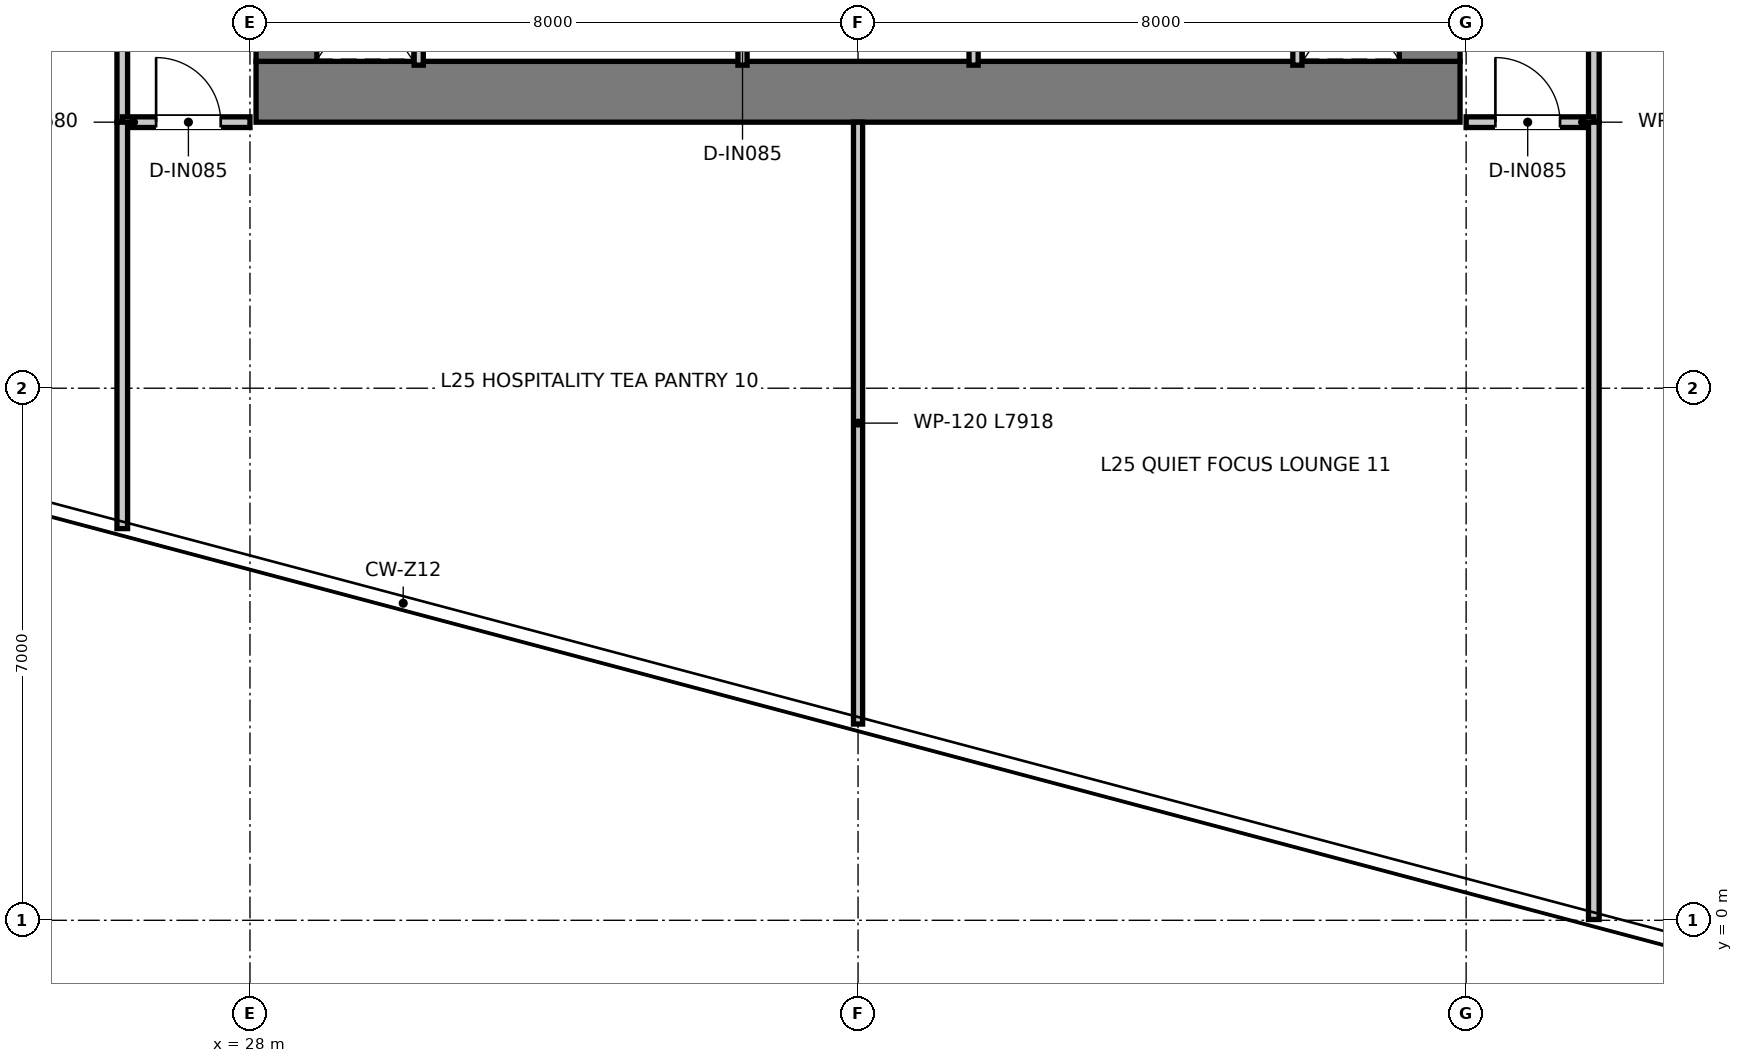
"""IFC4 building model, lengths in metres.
Left out: names, types, materials, properties, quantities, classifications, styles, units other than length and angle.
Written with IfcOpenShell. Run it as: python <this file> out.ifc"""

import sys

from ifc_helpers import new_model, si_unit, direction, frame, frame_2d, origin, place, context, subcontext, project, spatial, rectangle, extrude, element, fill, save


model = new_model("IFC4")
c1 = context("Model", 3, precision=1e-05, world=origin(), true_north=direction((0.0, 1.0)))
c2 = subcontext(c1, "Body", "Model", "MODEL_VIEW")
j1 = project(units=[si_unit("LENGTHUNIT", "METRE"), si_unit("PLANEANGLEUNIT", "RADIAN")], contexts=[c1])
p1 = place(None, origin())
s1 = spatial("IfcSite", under=j1, at=p1, CompositionType="ELEMENT")
p2 = place(p1, origin())
s2 = spatial("IfcBuilding", under=s1, at=p2, CompositionType="ELEMENT")
p3 = place(p2, frame((0.0, 0.0, 105.85)))
s3 = spatial("IfcBuildingStorey", under=s2, at=p3, CompositionType="ELEMENT", Elevation=105.85)
p4 = place(p3, frame((28.08, 10.9, 0.0), z_axis=(0.0, 0.0, 1.0), x_axis=(1.0, 0.0, 0.0)))
e1 = element("IfcWall", 1, at=p4, inside=s3, PredefinedType="SHEAR", context=c2, shape_type="SweptSolid", body=[
    extrude(rectangle(XDim=15.84, YDim=0.8, at=frame_2d((7.92, 0.0))), origin(), (0.0, 0.0, 1.0), 3.95),
])
for number, where, z_axis, x_axis in (
    (2, (28.48, 11.3, 0.0), (0.0, 0.0, 1.0), (0.0, 1.0, 0.0)),
    (3, (43.52, 11.3, 0.0), (0.0, 0.0, 1.0), (0.0, 1.0, 0.0)),
):
    element("IfcWall", number, at=place(p3, frame(where, z_axis=z_axis, x_axis=x_axis)), inside=s3, PredefinedType="SHEAR", context=c2, shape_type="SweptSolid", body=[
        extrude(rectangle(XDim=14.7, YDim=0.8, at=frame_2d((7.35, 0.0))), origin(), (0.0, 0.0, 1.0), 3.95),
    ])
for number, where, z_axis, x_axis in (
    (4, (30.22, 11.25, 0.0), (0.0, 0.0, 1.0), (0.0, 1.0, 0.0)),
    (5, (41.78, 11.25, 0.0), (0.0, 0.0, 1.0), (0.0, 1.0, 0.0)),
):
    element("IfcWall", number, at=place(p3, frame(where, z_axis=z_axis, x_axis=x_axis)), inside=s3, PredefinedType="PARTITIONING", context=c2, shape_type="SweptSolid", body=[
        extrude(rectangle(XDim=1.97, YDim=0.12, at=frame_2d((0.985, 0.0))), origin(), (0.0, 0.0, 1.0), 3.67),
    ])
p5 = place(p3, frame((34.48, 11.25, 0.0), z_axis=(0.0, 0.0, 1.0), x_axis=(0.0, 1.0, 0.0)))
e6 = element("IfcWall", 6, at=p5, inside=s3, PredefinedType="PARTITIONING", context=c2, shape_type="SweptSolid", body=[
    extrude(rectangle(XDim=1.97, YDim=0.12, at=frame_2d((0.985, 0.0))), origin(), (0.0, 0.0, 1.0), 3.67),
])
p6 = place(p5, frame((0.545, 0.0, 0.0)))
e7 = element("IfcOpeningElement", 7, at=p6, cuts=e6, PredefinedType="OPENING", context=c2, shape_type="SweptSolid", body=[
    extrude(rectangle(XDim=0.85, YDim=2.1, at=frame_2d((0.425, 1.05))), frame((0.0, 0.07, 0.0), z_axis=(0.0, -1.0, 0.0), x_axis=(1.0, 0.0, 0.0)), (0.0, 0.0, 1.0), 0.14),
])
p7 = place(p3, frame((37.52, 11.25, 0.0), z_axis=(0.0, 0.0, 1.0), x_axis=(0.0, 1.0, 0.0)))
e8 = element("IfcWall", 8, at=p7, inside=s3, PredefinedType="PARTITIONING", context=c2, shape_type="SweptSolid", body=[
    extrude(rectangle(XDim=1.97, YDim=0.12, at=frame_2d((0.985, 0.0))), origin(), (0.0, 0.0, 1.0), 3.67),
])
p8 = place(p7, frame((0.545, 0.0, 0.0)))
e9 = element("IfcOpeningElement", 9, at=p8, cuts=e8, PredefinedType="OPENING", context=c2, shape_type="SweptSolid", body=[
    extrude(rectangle(XDim=0.85, YDim=2.1, at=frame_2d((0.425, 1.05))), frame((0.0, 0.07, 0.0), z_axis=(0.0, -1.0, 0.0), x_axis=(1.0, 0.0, 0.0)), (0.0, 0.0, 1.0), 0.14),
])
p9 = place(p3, frame((26.32, 10.5, 0.0), z_axis=(0.0, 0.0, 1.0), x_axis=(0.0, 1.0, 0.0)))
e10 = element("IfcWall", 10, at=p9, inside=s3, PredefinedType="PARTITIONING", context=c2, shape_type="SweptSolid", body=[
    extrude(rectangle(XDim=25.62, YDim=0.14, at=frame_2d((12.81, 0.0))), origin(), (0.0, 0.0, 1.0), 2.97),
])
p10 = place(p9, frame((11.775, 0.0, 0.0)))
e11 = element("IfcOpeningElement", 11, at=p10, cuts=e10, PredefinedType="OPENING", context=c2, shape_type="SweptSolid", body=[
    extrude(rectangle(XDim=0.95, YDim=2.1, at=frame_2d((0.475, 1.05))), frame((0.0, 0.08, 0.0), z_axis=(0.0, -1.0, 0.0), x_axis=(1.0, 0.0, 0.0)), (0.0, 0.0, 1.0), 0.16),
])
p11 = place(p9, frame((20.375, 0.0, 0.0)))
e12 = element("IfcOpeningElement", 12, at=p11, cuts=e10, PredefinedType="OPENING", context=c2, shape_type="SweptSolid", body=[
    extrude(rectangle(XDim=0.95, YDim=2.1, at=frame_2d((0.475, 1.05))), frame((0.0, 0.08, 0.0), z_axis=(0.0, -1.0, 0.0), x_axis=(1.0, 0.0, 0.0)), (0.0, 0.0, 1.0), 0.16),
])
p12 = place(p3, frame((45.68, 10.5, 0.0), z_axis=(0.0, 0.0, 1.0), x_axis=(0.0, 1.0, 0.0)))
e13 = element("IfcWall", 13, at=p12, inside=s3, PredefinedType="PARTITIONING", context=c2, shape_type="SweptSolid", body=[
    extrude(rectangle(XDim=25.62, YDim=0.14, at=frame_2d((12.81, 0.0))), origin(), (0.0, 0.0, 1.0), 2.97),
])
p13 = place(p12, frame((8.275, 0.0, 0.0)))
e14 = element("IfcOpeningElement", 14, at=p13, cuts=e13, PredefinedType="OPENING", context=c2, shape_type="SweptSolid", body=[
    extrude(rectangle(XDim=0.95, YDim=2.1, at=frame_2d((0.475, 1.05))), frame((0.0, 0.08, 0.0), z_axis=(0.0, -1.0, 0.0), x_axis=(1.0, 0.0, 0.0)), (0.0, 0.0, 1.0), 0.16),
])
p14 = place(p12, frame((14.025, 0.0, 0.0)))
e15 = element("IfcOpeningElement", 15, at=p14, cuts=e13, PredefinedType="OPENING", context=c2, shape_type="SweptSolid", body=[
    extrude(rectangle(XDim=0.95, YDim=2.1, at=frame_2d((0.475, 1.05))), frame((0.0, 0.08, 0.0), z_axis=(0.0, -1.0, 0.0), x_axis=(1.0, 0.0, 0.0)), (0.0, 0.0, 1.0), 0.16),
])
p15 = place(p12, frame((20.875, 0.0, 0.0)))
e16 = element("IfcOpeningElement", 16, at=p15, cuts=e13, PredefinedType="OPENING", context=c2, shape_type="SweptSolid", body=[
    extrude(rectangle(XDim=0.95, YDim=2.1, at=frame_2d((0.475, 1.05))), frame((0.0, 0.08, 0.0), z_axis=(0.0, -1.0, 0.0), x_axis=(1.0, 0.0, 0.0)), (0.0, 0.0, 1.0), 0.16),
])
p16 = place(p3, frame((26.32, 10.5, 0.0), z_axis=(0.0, 0.0, 1.0), x_axis=(1.0, 0.0, 0.0)))
e17 = element("IfcWall", 17, at=p16, inside=s3, PredefinedType="PARTITIONING", context=c2, shape_type="SweptSolid", body=[
    extrude(rectangle(XDim=1.68, YDim=0.14, at=frame_2d((0.84, 0.0))), origin(), (0.0, 0.0, 1.0), 3.67),
])
p17 = place(p16, frame((0.445, 0.0, 0.0)))
e18 = element("IfcOpeningElement", 18, at=p17, cuts=e17, PredefinedType="OPENING", context=c2, shape_type="SweptSolid", body=[
    extrude(rectangle(XDim=0.85, YDim=2.1, at=frame_2d((0.425, 1.05))), frame((0.0, 0.08, 0.0), z_axis=(0.0, -1.0, 0.0), x_axis=(1.0, 0.0, 0.0)), (0.0, 0.0, 1.0), 0.16),
])
p18 = place(p3, frame((44.0, 10.5, 0.0), z_axis=(0.0, 0.0, 1.0), x_axis=(1.0, 0.0, 0.0)))
e19 = element("IfcWall", 19, at=p18, inside=s3, PredefinedType="PARTITIONING", context=c2, shape_type="SweptSolid", body=[
    extrude(rectangle(XDim=1.68, YDim=0.14, at=frame_2d((0.84, 0.0))), origin(), (0.0, 0.0, 1.0), 3.67),
])
p19 = place(p18, frame((0.385, 0.0, 0.0)))
e20 = element("IfcOpeningElement", 20, at=p19, cuts=e19, PredefinedType="OPENING", context=c2, shape_type="SweptSolid", body=[
    extrude(rectangle(XDim=0.85, YDim=2.1, at=frame_2d((0.425, 1.05))), frame((0.0, 0.08, 0.0), z_axis=(0.0, -1.0, 0.0), x_axis=(1.0, 0.0, 0.0)), (0.0, 0.0, 1.0), 0.16),
])
p20 = place(p3, frame((26.32, 5.153, 0.0), z_axis=(0.0, 0.0, 1.0), x_axis=(0.0, 1.0, 0.0)))
e21 = element("IfcWall", 21, at=p20, inside=s3, PredefinedType="PARTITIONING", context=c2, shape_type="SweptSolid", body=[
    extrude(rectangle(XDim=5.347, YDim=0.14, at=frame_2d((2.674, 0.0))), origin(), (0.0, 0.0, 1.0), 3.67),
])
p21 = place(p3, frame((45.68, 0.01, 0.0), z_axis=(0.0, 0.0, 1.0), x_axis=(0.0, 1.0, 0.0)))
e22 = element("IfcWall", 22, at=p21, inside=s3, PredefinedType="PARTITIONING", context=c2, shape_type="SweptSolid", body=[
    extrude(rectangle(XDim=10.49, YDim=0.14, at=frame_2d((5.245, 0.0))), origin(), (0.0, 0.0, 1.0), 3.67),
])
p22 = place(p3, frame((36.0, 2.582, 0.0), z_axis=(0.0, 0.0, 1.0), x_axis=(0.0, 1.0, 0.0)))
e23 = element("IfcWall", 23, at=p22, inside=s3, PredefinedType="PARTITIONING", context=c2, shape_type="SweptSolid", body=[
    extrude(rectangle(XDim=7.918, YDim=0.12, at=frame_2d((3.959, 0.0))), origin(), (0.0, 0.0, 1.0), 3.67),
])
p23 = place(p17, origin())
e24 = element("IfcDoor", 24, at=p23, inside=s3, OperationType="SINGLE_SWING_LEFT", PredefinedType="DOOR", context=c2, shape_type="SweptSolid", body=[
    extrude(rectangle(XDim=0.85, YDim=2.1, at=frame_2d((0.425, 1.05))), frame((0.0, 0.025, 0.0), z_axis=(0.0, -1.0, 0.0), x_axis=(1.0, 0.0, 0.0)), (0.0, 0.0, 1.0), 0.05),
])
fill(e18, e24)
p24 = place(p19, origin())
e25 = element("IfcDoor", 25, at=p24, inside=s3, OperationType="SINGLE_SWING_LEFT", PredefinedType="DOOR", context=c2, shape_type="SweptSolid", body=[
    extrude(rectangle(XDim=0.85, YDim=2.1, at=frame_2d((0.425, 1.05))), frame((0.0, 0.025, 0.0), z_axis=(0.0, -1.0, 0.0), x_axis=(1.0, 0.0, 0.0)), (0.0, 0.0, 1.0), 0.05),
])
fill(e20, e25)
save(model, sys.argv[1])
